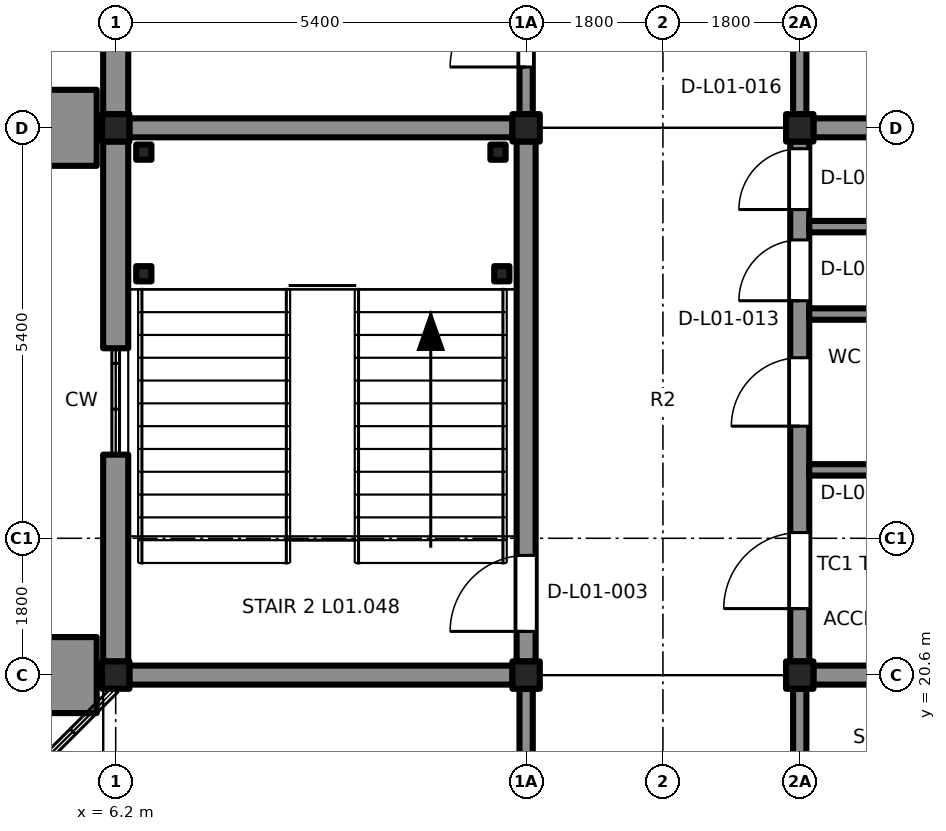
"""IFC4 building model, lengths in metres.
Left out: names, types, materials, properties, quantities, classifications, styles, units other than length and angle.
Written with IfcOpenShell. Run it as: python <this file> out.ifc"""

import sys

from ifc_helpers import new_model, si_unit, direction, frame, frame_2d, origin, origin_2d, place, context, subcontext, project, spatial, rectangle, extrude, element, fill, save


model = new_model("IFC4")
c1 = context("Model", 3, precision=1e-05, world=origin(), true_north=direction((0.0, 1.0)))
c2 = subcontext(c1, "Body", "Model", "MODEL_VIEW")
j1 = project(units=[si_unit("LENGTHUNIT", "METRE"), si_unit("PLANEANGLEUNIT", "RADIAN")], contexts=[c1])
p1 = place(None, origin())
s1 = spatial("IfcSite", under=j1, at=p1, CompositionType="ELEMENT")
p2 = place(p1, origin())
s2 = spatial("IfcBuilding", under=s1, at=p2, CompositionType="ELEMENT")
p3 = place(p2, frame((0.0, 0.0, 6.3)))
s3 = spatial("IfcBuildingStorey", under=s2, at=p3, CompositionType="ELEMENT", Elevation=6.3)
for number, where, z_axis, x_axis in (
    (1, (6.2, 20.6, 0.0), (0.0, 0.0, 1.0), (1.0, 0.0, 0.0)),
    (2, (11.6, 20.6, 0.0), (0.0, 0.0, 1.0), (1.0, 0.0, 0.0)),
    (3, (15.2, 20.6, 0.0), (0.0, 0.0, 1.0), (1.0, 0.0, 0.0)),
    (4, (6.2, 27.8, 0.0), (0.0, 0.0, 1.0), (1.0, 0.0, 0.0)),
    (5, (11.6, 27.8, 0.0), (0.0, 0.0, 1.0), (1.0, 0.0, 0.0)),
    (6, (15.2, 27.8, 0.0), (0.0, 0.0, 1.0), (1.0, 0.0, 0.0)),
):
    element("IfcColumn", number, at=place(p3, frame(where, z_axis=z_axis, x_axis=x_axis)), inside=s3, PredefinedType="COLUMN", context=c2, shape_type="SweptSolid", body=[
        extrude(rectangle(XDim=0.36, YDim=0.36, at=origin_2d()), origin(), (0.0, 0.0, 1.0), 3.9),
    ])
p4 = place(p3, frame((11.6, 20.78, 0.0), z_axis=(0.0, 0.0, 1.0), x_axis=(0.0, 1.0, 0.0)))
e7 = element("IfcWall", 7, at=p4, inside=s3, PredefinedType="SHEAR", context=c2, shape_type="SweptSolid", body=[
    extrude(rectangle(XDim=6.84, YDim=0.25, at=frame_2d((3.42, 0.0))), origin(), (0.0, 0.0, 1.0), 3.65),
])
p5 = place(p4, frame((0.395, 0.0, 0.0)))
e8 = element("IfcOpeningElement", 8, at=p5, cuts=e7, PredefinedType="OPENING", context=c2, shape_type="SweptSolid", body=[
    extrude(rectangle(XDim=1.0, YDim=2.1, at=frame_2d((0.5, 1.05))), frame((0.0, 0.135, 0.0), z_axis=(0.0, -1.0, 0.0), x_axis=(1.0, 0.0, 0.0)), (0.0, 0.0, 1.0), 0.27),
])
for number, where, z_axis, x_axis in (
    (9, (6.38, 20.6, 0.0), (0.0, 0.0, 1.0), (1.0, 0.0, 0.0)),
    (10, (6.38, 27.8, 0.0), (0.0, 0.0, 1.0), (1.0, 0.0, 0.0)),
):
    element("IfcWall", number, at=place(p3, frame(where, z_axis=z_axis, x_axis=x_axis)), inside=s3, PredefinedType="SHEAR", context=c2, shape_type="SweptSolid", body=[
        extrude(rectangle(XDim=5.04, YDim=0.25, at=frame_2d((2.52, 0.0))), origin(), (0.0, 0.0, 1.0), 3.65),
    ])
p6 = place(p3, frame((15.2, 20.78, 0.0), z_axis=(0.0, 0.0, 1.0), x_axis=(0.0, 1.0, 0.0)))
e11 = element("IfcWall", 11, at=p6, inside=s3, PredefinedType="SHEAR", context=c2, shape_type="SweptSolid", body=[
    extrude(rectangle(XDim=6.84, YDim=0.25, at=frame_2d((3.42, 0.0))), origin(), (0.0, 0.0, 1.0), 3.65),
])
p7 = place(p6, frame((0.695, 0.0, 0.0)))
e12 = element("IfcOpeningElement", 12, at=p7, cuts=e11, PredefinedType="OPENING", context=c2, shape_type="SweptSolid", body=[
    extrude(rectangle(XDim=1.0, YDim=2.1, at=frame_2d((0.5, 1.05))), frame((0.0, 0.135, 0.0), z_axis=(0.0, -1.0, 0.0), x_axis=(1.0, 0.0, 0.0)), (0.0, 0.0, 1.0), 0.27),
])
p8 = place(p6, frame((3.095, 0.0, 0.0)))
e13 = element("IfcOpeningElement", 13, at=p8, cuts=e11, PredefinedType="OPENING", context=c2, shape_type="SweptSolid", body=[
    extrude(rectangle(XDim=0.9, YDim=2.1, at=frame_2d((0.45, 1.05))), frame((0.0, 0.135, 0.0), z_axis=(0.0, -1.0, 0.0), x_axis=(1.0, 0.0, 0.0)), (0.0, 0.0, 1.0), 0.27),
])
p9 = place(p6, frame((4.745, 0.0, 0.0)))
e14 = element("IfcOpeningElement", 14, at=p9, cuts=e11, PredefinedType="OPENING", context=c2, shape_type="SweptSolid", body=[
    extrude(rectangle(XDim=0.8, YDim=2.1, at=frame_2d((0.4, 1.05))), frame((0.0, 0.135, 0.0), z_axis=(0.0, -1.0, 0.0), x_axis=(1.0, 0.0, 0.0)), (0.0, 0.0, 1.0), 0.27),
])
p10 = place(p6, frame((5.945, 0.0, 0.0)))
e15 = element("IfcOpeningElement", 15, at=p10, cuts=e11, PredefinedType="OPENING", context=c2, shape_type="SweptSolid", body=[
    extrude(rectangle(XDim=0.8, YDim=2.1, at=frame_2d((0.4, 1.05))), frame((0.0, 0.135, 0.0), z_axis=(0.0, -1.0, 0.0), x_axis=(1.0, 0.0, 0.0)), (0.0, 0.0, 1.0), 0.27),
])
for number, where, z_axis, x_axis in (
    (16, (15.38, 20.6, 0.0), (0.0, 0.0, 1.0), (1.0, 0.0, 0.0)),
    (17, (15.38, 27.8, 0.0), (0.0, 0.0, 1.0), (1.0, 0.0, 0.0)),
):
    element("IfcWall", number, at=place(p3, frame(where, z_axis=z_axis, x_axis=x_axis)), inside=s3, PredefinedType="SHEAR", context=c2, shape_type="SweptSolid", body=[
        extrude(rectangle(XDim=5.04, YDim=0.25, at=frame_2d((2.52, 0.0))), origin(), (0.0, 0.0, 1.0), 3.65),
    ])
for number, where, z_axis, x_axis in (
    (18, (15.325, 23.3, 0.0), (0.0, 0.0, 1.0), (1.0, 0.0, 0.0)),
    (19, (15.325, 25.35, 0.0), (0.0, 0.0, 1.0), (1.0, 0.0, 0.0)),
    (20, (15.325, 26.5, 0.0), (0.0, 0.0, 1.0), (1.0, 0.0, 0.0)),
):
    element("IfcWall", number, at=place(p3, frame(where, z_axis=z_axis, x_axis=x_axis)), inside=s3, PredefinedType="PARTITIONING", context=c2, shape_type="SweptSolid", body=[
        extrude(rectangle(XDim=5.11, YDim=0.15, at=frame_2d((2.555, 0.0))), origin(), (0.0, 0.0, 1.0), 3.65),
    ])
for number, where, z_axis, x_axis in (
    (21, (6.57, 27.48, 0.0), (0.0, 0.0, 1.0), (1.0, 0.0, 0.0)),
    (22, (11.23, 27.48, 0.0), (0.0, 0.0, 1.0), (1.0, 0.0, 0.0)),
    (23, (6.57, 25.88, 0.0), (0.0, 0.0, 1.0), (1.0, 0.0, 0.0)),
    (24, (11.28, 25.88, 0.0), (0.0, 0.0, 1.0), (1.0, 0.0, 0.0)),
):
    element("IfcColumn", number, at=place(p3, frame(where, z_axis=z_axis, x_axis=x_axis)), inside=s3, PredefinedType="COLUMN", context=c2, shape_type="SweptSolid", body=[
        extrude(rectangle(XDim=0.2, YDim=0.2, at=origin_2d()), origin(), (0.0, 0.0, 1.0), 3.9),
    ])
p11 = place(p3, frame((6.2, 20.78, 0.0), z_axis=(0.0, 0.0, 1.0), x_axis=(0.0, 1.0, 0.0)))
e25 = element("IfcWall", 25, at=p11, inside=s3, PredefinedType="SOLIDWALL", context=c2, shape_type="SweptSolid", body=[
    extrude(rectangle(XDim=2.72, YDim=0.33, at=frame_2d((1.36, 0.0))), origin(), (0.0, 0.0, 1.0), 3.22),
])
p12 = place(p3, frame((6.2, 24.9, 0.0), z_axis=(0.0, 0.0, 1.0), x_axis=(0.0, 1.0, 0.0)))
e26 = element("IfcWall", 26, at=p12, inside=s3, PredefinedType="SOLIDWALL", context=c2, shape_type="SweptSolid", body=[
    extrude(rectangle(XDim=2.72, YDim=0.33, at=frame_2d((1.36, 0.0))), origin(), (0.0, 0.0, 1.0), 3.22),
])
p13 = place(p3, frame((6.2, 27.98, 0.0), z_axis=(0.0, 0.0, 1.0), x_axis=(0.0, 1.0, 0.0)))
e27 = element("IfcWall", 27, at=p13, inside=s3, PredefinedType="SOLIDWALL", context=c2, shape_type="SweptSolid", body=[
    extrude(rectangle(XDim=3.42, YDim=0.33, at=frame_2d((1.71, 0.0))), origin(), (0.0, 0.0, 1.0), 3.22),
])
p14 = place(p13, frame((1.02, 0.0, 0.6)))
e28 = element("IfcOpeningElement", 28, at=p14, cuts=e27, PredefinedType="OPENING", context=c2, shape_type="SweptSolid", body=[
    extrude(rectangle(XDim=1.2, YDim=2.1, at=frame_2d((0.6, 1.05))), frame((0.0, 0.175, 0.0), z_axis=(0.0, -1.0, 0.0), x_axis=(1.0, 0.0, 0.0)), (0.0, 0.0, 1.0), 0.35),
])
for number, where, z_axis, x_axis in (
    (29, (5.575, 20.1, 0.0), (0.0, 0.0, 1.0), (0.0, 1.0, 0.0)),
    (30, (5.575, 27.3, 0.0), (0.0, 0.0, 1.0), (0.0, 1.0, 0.0)),
):
    element("IfcWall", number, at=place(p3, frame(where, z_axis=z_axis, x_axis=x_axis)), inside=s3, PredefinedType="SOLIDWALL", context=c2, shape_type="SweptSolid", body=[
        extrude(rectangle(XDim=1.0, YDim=0.75, at=frame_2d((0.5, 0.0))), origin(), (0.0, 0.0, 1.0), 3.9),
    ])
p15 = place(p3, frame((11.6, 13.58, 0.0), z_axis=(0.0, 0.0, 1.0), x_axis=(0.0, 1.0, 0.0)))
e31 = element("IfcWall", 31, at=p15, inside=s3, PredefinedType="PARTITIONING", context=c2, shape_type="SweptSolid", body=[
    extrude(rectangle(XDim=6.84, YDim=0.175, at=frame_2d((3.42, 0.0))), origin(), (0.0, 0.0, 1.0), 3.22),
])
p16 = place(p15, frame((0.62, 0.0, 0.0)))
e32 = element("IfcOpeningElement", 32, at=p16, cuts=e31, PredefinedType="OPENING", context=c2, shape_type="SweptSolid", body=[
    extrude(rectangle(XDim=2.0, YDim=2.4, at=frame_2d((1.0, 1.2))), frame((0.0, 0.097, 0.0), z_axis=(0.0, -1.0, 0.0), x_axis=(1.0, 0.0, 0.0)), (0.0, 0.0, 1.0), 0.195),
])
p17 = place(p3, frame((11.6, 27.98, 0.0), z_axis=(0.0, 0.0, 1.0), x_axis=(0.0, 1.0, 0.0)))
e33 = element("IfcWall", 33, at=p17, inside=s3, PredefinedType="PARTITIONING", context=c2, shape_type="SweptSolid", body=[
    extrude(rectangle(XDim=6.84, YDim=0.175, at=frame_2d((3.42, 0.0))), origin(), (0.0, 0.0, 1.0), 3.22),
])
p18 = place(p17, frame((0.62, 0.0, 0.0)))
e34 = element("IfcOpeningElement", 34, at=p18, cuts=e33, PredefinedType="OPENING", context=c2, shape_type="SweptSolid", body=[
    extrude(rectangle(XDim=2.0, YDim=2.4, at=frame_2d((1.0, 1.2))), frame((0.0, 0.097, 0.0), z_axis=(0.0, -1.0, 0.0), x_axis=(1.0, 0.0, 0.0)), (0.0, 0.0, 1.0), 0.195),
])
p19 = place(p3, frame((15.2, 20.42, 0.0), z_axis=(0.0, 0.0, 1.0), x_axis=(0.0, -1.0, 0.0)))
e35 = element("IfcWall", 35, at=p19, inside=s3, PredefinedType="PARTITIONING", context=c2, shape_type="SweptSolid", body=[
    extrude(rectangle(XDim=3.42, YDim=0.175, at=frame_2d((1.71, 0.0))), origin(), (0.0, 0.0, 1.0), 3.22),
])
p20 = place(p19, frame((0.87, 0.0, 0.0)))
e36 = element("IfcOpeningElement", 36, at=p20, cuts=e35, PredefinedType="OPENING", context=c2, shape_type="SweptSolid", body=[
    extrude(rectangle(XDim=1.5, YDim=2.1, at=frame_2d((0.75, 1.05))), frame((0.0, 0.097, 0.0), z_axis=(0.0, -1.0, 0.0), x_axis=(1.0, 0.0, 0.0)), (0.0, 0.0, 1.0), 0.195),
])
p21 = place(p3, frame((15.2, 31.4, 0.0), z_axis=(0.0, 0.0, 1.0), x_axis=(0.0, -1.0, 0.0)))
e37 = element("IfcWall", 37, at=p21, inside=s3, PredefinedType="PARTITIONING", context=c2, shape_type="SweptSolid", body=[
    extrude(rectangle(XDim=3.42, YDim=0.175, at=frame_2d((1.71, 0.0))), origin(), (0.0, 0.0, 1.0), 3.22),
])
p22 = place(p21, frame((1.05, 0.0, 0.0)))
e38 = element("IfcOpeningElement", 38, at=p22, cuts=e37, PredefinedType="OPENING", context=c2, shape_type="SweptSolid", body=[
    extrude(rectangle(XDim=1.5, YDim=2.1, at=frame_2d((0.75, 1.05))), frame((0.0, 0.097, 0.0), z_axis=(0.0, -1.0, 0.0), x_axis=(1.0, 0.0, 0.0)), (0.0, 0.0, 1.0), 0.195),
])
p23 = place(p5, origin())
e39 = element("IfcDoor", 39, at=p23, inside=s3, OperationType="SINGLE_SWING_RIGHT", PredefinedType="DOOR", context=c2, shape_type="SweptSolid", body=[
    extrude(rectangle(XDim=1.0, YDim=2.1, at=frame_2d((0.5, 1.05))), frame((0.0, 0.025, 0.0), z_axis=(0.0, -1.0, 0.0), x_axis=(1.0, 0.0, 0.0)), (0.0, 0.0, 1.0), 0.05),
])
fill(e8, e39)
p24 = place(p7, origin())
e40 = element("IfcDoor", 40, at=p24, inside=s3, OperationType="SINGLE_SWING_LEFT", PredefinedType="DOOR", context=c2, shape_type="SweptSolid", body=[
    extrude(rectangle(XDim=1.0, YDim=2.1, at=frame_2d((0.5, 1.05))), frame((0.0, 0.025, 0.0), z_axis=(0.0, -1.0, 0.0), x_axis=(1.0, 0.0, 0.0)), (0.0, 0.0, 1.0), 0.05),
])
fill(e12, e40)
p25 = place(p8, origin())
e41 = element("IfcDoor", 41, at=p25, inside=s3, OperationType="SINGLE_SWING_LEFT", PredefinedType="DOOR", context=c2, shape_type="SweptSolid", body=[
    extrude(rectangle(XDim=0.9, YDim=2.1, at=frame_2d((0.45, 1.05))), frame((0.0, 0.025, 0.0), z_axis=(0.0, -1.0, 0.0), x_axis=(1.0, 0.0, 0.0)), (0.0, 0.0, 1.0), 0.05),
])
fill(e13, e41)
p26 = place(p9, origin())
e42 = element("IfcDoor", 42, at=p26, inside=s3, OperationType="SINGLE_SWING_LEFT", PredefinedType="DOOR", context=c2, shape_type="SweptSolid", body=[
    extrude(rectangle(XDim=0.8, YDim=2.1, at=frame_2d((0.4, 1.05))), frame((0.0, 0.025, 0.0), z_axis=(0.0, -1.0, 0.0), x_axis=(1.0, 0.0, 0.0)), (0.0, 0.0, 1.0), 0.05),
])
fill(e14, e42)
p27 = place(p10, origin())
e43 = element("IfcDoor", 43, at=p27, inside=s3, OperationType="SINGLE_SWING_LEFT", PredefinedType="DOOR", context=c2, shape_type="SweptSolid", body=[
    extrude(rectangle(XDim=0.8, YDim=2.1, at=frame_2d((0.4, 1.05))), frame((0.0, 0.025, 0.0), z_axis=(0.0, -1.0, 0.0), x_axis=(1.0, 0.0, 0.0)), (0.0, 0.0, 1.0), 0.05),
])
fill(e15, e43)
p28 = place(p18, origin())
e44 = element("IfcDoor", 44, at=p28, inside=s3, OperationType="DOUBLE_DOOR_SINGLE_SWING", PredefinedType="DOOR", context=c2, shape_type="SweptSolid", body=[
    extrude(rectangle(XDim=2.0, YDim=2.4, at=frame_2d((1.0, 1.2))), frame((0.0, 0.025, 0.0), z_axis=(0.0, -1.0, 0.0), x_axis=(1.0, 0.0, 0.0)), (0.0, 0.0, 1.0), 0.05),
])
fill(e34, e44)
save(model, sys.argv[1])
